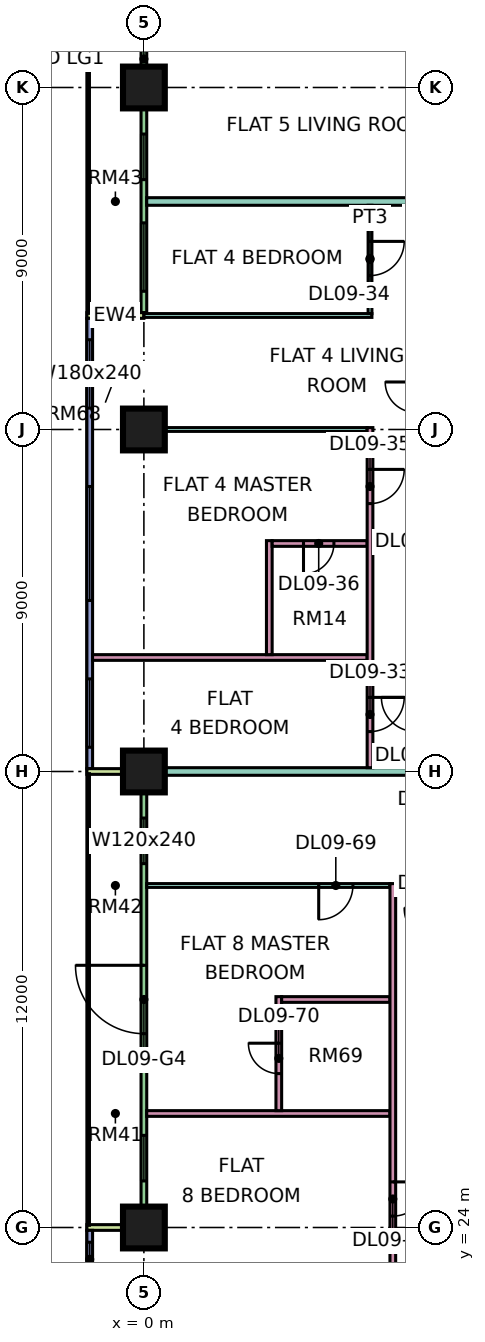
"""IFC4 building model, lengths in metres.
Left out: names, types, materials, properties, quantities, classifications, styles, units other than length and angle.
Written with IfcOpenShell. Run it as: python <this file> out.ifc"""

import sys

from ifc_helpers import new_model, si_unit, direction, frame, frame_2d, origin, origin_2d, place, context, subcontext, project, spatial, rectangle, extrude, element, fill, save


model = new_model("IFC4")
c1 = context("Model", 3, precision=1e-05, world=origin(), true_north=direction((0.0, 1.0)))
c2 = subcontext(c1, "Body", "Model", "MODEL_VIEW")
j1 = project(units=[si_unit("LENGTHUNIT", "METRE"), si_unit("PLANEANGLEUNIT", "RADIAN")], contexts=[c1])
p1 = place(None, origin())
s1 = spatial("IfcSite", under=j1, at=p1, CompositionType="ELEMENT")
p2 = place(p1, origin())
s2 = spatial("IfcBuilding", under=s1, at=p2, CompositionType="ELEMENT")
p3 = place(p2, frame((0.0, 0.0, 48.9)))
s3 = spatial("IfcBuildingStorey", under=s2, at=p3, CompositionType="ELEMENT", Elevation=48.9)
p4 = place(p3, frame((0.0, 24.0, 0.0), z_axis=(0.0, 0.0, 1.0), x_axis=(1.0, 0.0, 0.0)))
e1 = element("IfcColumn", 1, at=p4, inside=s3, PredefinedType="COLUMN", context=c2, shape_type="SweptSolid", body=[
    extrude(rectangle(XDim=1.1, YDim=1.1, at=origin_2d()), origin(), (0.0, 0.0, 1.0), 3.75),
])
p5 = place(p3, frame((0.0, 36.0, 0.0), z_axis=(0.0, 0.0, 1.0), x_axis=(1.0, 0.0, 0.0)))
e2 = element("IfcColumn", 2, at=p5, inside=s3, PredefinedType="COLUMN", context=c2, shape_type="SweptSolid", body=[
    extrude(rectangle(XDim=1.1, YDim=1.1, at=origin_2d()), origin(), (0.0, 0.0, 1.0), 3.75),
])
p6 = place(p3, frame((0.0, 45.0, 0.0), z_axis=(0.0, 0.0, 1.0), x_axis=(1.0, 0.0, 0.0)))
e3 = element("IfcColumn", 3, at=p6, inside=s3, PredefinedType="COLUMN", context=c2, shape_type="SweptSolid", body=[
    extrude(rectangle(XDim=1.1, YDim=1.1, at=origin_2d()), origin(), (0.0, 0.0, 1.0), 3.75),
])
p7 = place(p3, frame((0.0, 54.0, 0.0), z_axis=(0.0, 0.0, 1.0), x_axis=(1.0, 0.0, 0.0)))
e4 = element("IfcColumn", 4, at=p7, inside=s3, PredefinedType="COLUMN", context=c2, shape_type="SweptSolid", body=[
    extrude(rectangle(XDim=1.1, YDim=1.1, at=origin_2d()), origin(), (0.0, 0.0, 1.0), 3.75),
])
p8 = place(p3, frame((0.0, 61.425, 0.0), z_axis=(0.0, 0.0, 1.0), x_axis=(0.0, -1.0, 0.0)))
e5 = element("IfcWall", 5, at=p8, inside=s3, PredefinedType="SOLIDWALL", context=c2, shape_type="SweptSolid", body=[
    extrude(rectangle(XDim=13.35, YDim=0.15, at=frame_2d((6.675, 0.0))), origin(), (0.0, 0.0, 1.0), 3.35),
])
p9 = place(p8, frame((1.312, 0.0, 0.0)))
e6 = element("IfcOpeningElement", 6, at=p9, cuts=e5, PredefinedType="OPENING", context=c2, shape_type="SweptSolid", body=[
    extrude(rectangle(XDim=1.8, YDim=2.4, at=frame_2d((0.9, 1.2))), frame((0.0, 0.085, 0.0), z_axis=(0.0, -1.0, 0.0), x_axis=(1.0, 0.0, 0.0)), (0.0, 0.0, 1.0), 0.17),
])
p10 = place(p8, frame((5.0, 0.0, 0.45)))
e7 = element("IfcOpeningElement", 7, at=p10, cuts=e5, PredefinedType="OPENING", context=c2, shape_type="SweptSolid", body=[
    extrude(rectangle(XDim=1.2, YDim=2.4, at=frame_2d((0.6, 1.2))), frame((0.0, 0.085, 0.0), z_axis=(0.0, -1.0, 0.0), x_axis=(1.0, 0.0, 0.0)), (0.0, 0.0, 1.0), 0.17),
])
p11 = place(p8, frame((8.65, 0.0, 0.45)))
e8 = element("IfcOpeningElement", 8, at=p11, cuts=e5, PredefinedType="OPENING", context=c2, shape_type="SweptSolid", body=[
    extrude(rectangle(XDim=1.2, YDim=2.4, at=frame_2d((0.6, 1.2))), frame((0.0, 0.085, 0.0), z_axis=(0.0, -1.0, 0.0), x_axis=(1.0, 0.0, 0.0)), (0.0, 0.0, 1.0), 0.17),
])
p12 = place(p8, frame((10.988, 0.0, 0.45)))
e9 = element("IfcOpeningElement", 9, at=p12, cuts=e5, PredefinedType="OPENING", context=c2, shape_type="SweptSolid", body=[
    extrude(rectangle(XDim=1.8, YDim=2.4, at=frame_2d((0.9, 1.2))), frame((0.0, 0.085, 0.0), z_axis=(0.0, -1.0, 0.0), x_axis=(1.0, 0.0, 0.0)), (0.0, 0.0, 1.0), 0.17),
])
p13 = place(p3, frame((-1.5, 48.0, 0.0), z_axis=(0.0, 0.0, 1.0), x_axis=(1.0, 0.0, 0.0)))
e10 = element("IfcWall", 10, at=p13, inside=s3, PredefinedType="SOLIDWALL", context=c2, shape_type="SweptSolid", body=[
    extrude(rectangle(XDim=1.5, YDim=0.15, at=frame_2d((0.75, 0.0))), origin(), (0.0, 0.0, 1.0), 3.35),
])
p14 = place(p3, frame((-1.425, 47.925, 0.0), z_axis=(0.0, 0.0, 1.0), x_axis=(0.0, -1.0, 0.0)))
e11 = element("IfcWall", 11, at=p14, inside=s3, PredefinedType="SOLIDWALL", context=c2, shape_type="SweptSolid", body=[
    extrude(rectangle(XDim=11.85, YDim=0.15, at=frame_2d((5.925, 0.0))), origin(), (0.0, 0.0, 1.0), 3.35),
])
p15 = place(p14, frame((0.562, 0.0, 0.45)))
e12 = element("IfcOpeningElement", 12, at=p15, cuts=e11, PredefinedType="OPENING", context=c2, shape_type="SweptSolid", body=[
    extrude(rectangle(XDim=1.8, YDim=2.4, at=frame_2d((0.9, 1.2))), frame((0.0, 0.085, 0.0), z_axis=(0.0, -1.0, 0.0), x_axis=(1.0, 0.0, 0.0)), (0.0, 0.0, 1.0), 0.17),
])
p16 = place(p14, frame((4.425, 0.0, 0.45)))
e13 = element("IfcOpeningElement", 13, at=p16, cuts=e11, PredefinedType="OPENING", context=c2, shape_type="SweptSolid", body=[
    extrude(rectangle(XDim=3.0, YDim=2.4, at=frame_2d((1.5, 1.2))), frame((0.0, 0.085, 0.0), z_axis=(0.0, -1.0, 0.0), x_axis=(1.0, 0.0, 0.0)), (0.0, 0.0, 1.0), 0.17),
])
p17 = place(p14, frame((9.488, 0.0, 0.45)))
e14 = element("IfcOpeningElement", 14, at=p17, cuts=e11, PredefinedType="OPENING", context=c2, shape_type="SweptSolid", body=[
    extrude(rectangle(XDim=1.8, YDim=2.4, at=frame_2d((0.9, 1.2))), frame((0.0, 0.085, 0.0), z_axis=(0.0, -1.0, 0.0), x_axis=(1.0, 0.0, 0.0)), (0.0, 0.0, 1.0), 0.17),
])
p18 = place(p3, frame((0.0, 35.925, 0.0), z_axis=(0.0, 0.0, 1.0), x_axis=(0.0, -1.0, 0.0)))
e15 = element("IfcWall", 15, at=p18, inside=s3, PredefinedType="SOLIDWALL", context=c2, shape_type="SweptSolid", body=[
    extrude(rectangle(XDim=11.85, YDim=0.15, at=frame_2d((5.925, 0.0))), origin(), (0.0, 0.0, 1.0), 3.35),
])
p19 = place(p18, frame((1.15, 0.0, 0.45)))
e16 = element("IfcOpeningElement", 16, at=p19, cuts=e15, PredefinedType="OPENING", context=c2, shape_type="SweptSolid", body=[
    extrude(rectangle(XDim=1.2, YDim=2.4, at=frame_2d((0.6, 1.2))), frame((0.0, 0.085, 0.0), z_axis=(0.0, -1.0, 0.0), x_axis=(1.0, 0.0, 0.0)), (0.0, 0.0, 1.0), 0.17),
])
p20 = place(p18, frame((5.025, 0.0, 0.0)))
e17 = element("IfcOpeningElement", 17, at=p20, cuts=e15, PredefinedType="OPENING", context=c2, shape_type="SweptSolid", body=[
    extrude(rectangle(XDim=1.8, YDim=2.4, at=frame_2d((0.9, 1.2))), frame((0.0, 0.085, 0.0), z_axis=(0.0, -1.0, 0.0), x_axis=(1.0, 0.0, 0.0)), (0.0, 0.0, 1.0), 0.17),
])
p21 = place(p18, frame((9.5, 0.0, 0.45)))
e18 = element("IfcOpeningElement", 18, at=p21, cuts=e15, PredefinedType="OPENING", context=c2, shape_type="SweptSolid", body=[
    extrude(rectangle(XDim=1.2, YDim=2.4, at=frame_2d((0.6, 1.2))), frame((0.0, 0.085, 0.0), z_axis=(0.0, -1.0, 0.0), x_axis=(1.0, 0.0, 0.0)), (0.0, 0.0, 1.0), 0.17),
])
for number, where, z_axis, x_axis in (
    (19, (-1.5, 36.0, 0.0), (0.0, 0.0, 1.0), (1.0, 0.0, 0.0)),
    (20, (-1.5, 24.0, 0.0), (0.0, 0.0, 1.0), (1.0, 0.0, 0.0)),
):
    element("IfcWall", number, at=place(p3, frame(where, z_axis=z_axis, x_axis=x_axis)), inside=s3, PredefinedType="SOLIDWALL", context=c2, shape_type="SweptSolid", body=[
        extrude(rectangle(XDim=1.5, YDim=0.15, at=frame_2d((0.75, 0.0))), origin(), (0.0, 0.0, 1.0), 3.35),
    ])
p22 = place(p3, frame((-1.425, 23.925, 0.0), z_axis=(0.0, 0.0, 1.0), x_axis=(0.0, -1.0, 0.0)))
e21 = element("IfcWall", 21, at=p22, inside=s3, PredefinedType="SOLIDWALL", context=c2, shape_type="SweptSolid", body=[
    extrude(rectangle(XDim=11.425, YDim=0.15, at=frame_2d((5.712, 0.0))), origin(), (0.0, 0.0, 1.0), 3.35),
])
p23 = place(p22, frame((0.312, 0.0, 0.45)))
e22 = element("IfcOpeningElement", 22, at=p23, cuts=e21, PredefinedType="OPENING", context=c2, shape_type="SweptSolid", body=[
    extrude(rectangle(XDim=0.9, YDim=2.4, at=frame_2d((0.45, 1.2))), frame((0.0, 0.085, 0.0), z_axis=(0.0, -1.0, 0.0), x_axis=(1.0, 0.0, 0.0)), (0.0, 0.0, 1.0), 0.17),
])
p24 = place(p22, frame((6.175, 0.0, 0.45)))
e23 = element("IfcOpeningElement", 23, at=p24, cuts=e21, PredefinedType="OPENING", context=c2, shape_type="SweptSolid", body=[
    extrude(rectangle(XDim=3.0, YDim=2.4, at=frame_2d((1.5, 1.2))), frame((0.0, 0.085, 0.0), z_axis=(0.0, -1.0, 0.0), x_axis=(1.0, 0.0, 0.0)), (0.0, 0.0, 1.0), 0.17),
])
p25 = place(p3, frame((-1.351, 39.0, 0.0), z_axis=(0.0, 0.0, 1.0), x_axis=(1.0, 0.0, 0.0)))
e24 = element("IfcWall", 24, at=p25, inside=s3, PredefinedType="PARTITIONING", context=c2, shape_type="SweptSolid", body=[
    extrude(rectangle(XDim=7.226, YDim=0.15, at=frame_2d((3.613, 0.0))), origin(), (0.0, 0.0, 1.0), 3.35),
])
e25 = element("IfcWall", 25, at=p5, inside=s3, PredefinedType="PARTITIONING", context=c2, shape_type="SweptSolid", body=[
    extrude(rectangle(XDim=12.45, YDim=0.2, at=frame_2d((6.225, 0.0))), origin(), (0.0, 0.0, 1.0), 3.35),
])
e26 = element("IfcWall", 26, at=p6, inside=s3, PredefinedType="PARTITIONING", context=c2, shape_type="SweptSolid", body=[
    extrude(rectangle(XDim=5.875, YDim=0.1, at=frame_2d((2.938, 0.0))), origin(), (0.0, 0.0, 1.0), 3.35),
])
p26 = place(p3, frame((0.0, 48.0, 0.0), z_axis=(0.0, 0.0, 1.0), x_axis=(1.0, 0.0, 0.0)))
e27 = element("IfcWall", 27, at=p26, inside=s3, PredefinedType="PARTITIONING", context=c2, shape_type="SweptSolid", body=[
    extrude(rectangle(XDim=6.0, YDim=0.1, at=frame_2d((3.0, 0.0))), origin(), (0.0, 0.0, 1.0), 3.35),
])
p27 = place(p3, frame((0.074, 27.0, 0.0), z_axis=(0.0, 0.0, 1.0), x_axis=(1.0, 0.0, 0.0)))
e28 = element("IfcWall", 28, at=p27, inside=s3, PredefinedType="PARTITIONING", context=c2, shape_type="SweptSolid", body=[
    extrude(rectangle(XDim=6.401, YDim=0.15, at=frame_2d((3.201, 0.0))), origin(), (0.0, 0.0, 1.0), 3.35),
])
p28 = place(p3, frame((0.074, 33.0, 0.0), z_axis=(0.0, 0.0, 1.0), x_axis=(1.0, 0.0, 0.0)))
e29 = element("IfcWall", 29, at=p28, inside=s3, PredefinedType="PARTITIONING", context=c2, shape_type="SweptSolid", body=[
    extrude(rectangle(XDim=6.401, YDim=0.1, at=frame_2d((3.201, 0.0))), origin(), (0.0, 0.0, 1.0), 3.35),
])
p29 = place(p28, frame((4.526, 0.0, 0.0)))
e30 = element("IfcOpeningElement", 30, at=p29, cuts=e29, PredefinedType="OPENING", context=c2, shape_type="SweptSolid", body=[
    extrude(rectangle(XDim=0.9, YDim=2.1, at=frame_2d((0.45, 1.05))), frame((0.0, 0.06, 0.0), z_axis=(0.0, -1.0, 0.0), x_axis=(1.0, 0.0, 0.0)), (0.0, 0.0, 1.0), 0.12),
])
p30 = place(p3, frame((0.074, 51.0, 0.0), z_axis=(0.0, 0.0, 1.0), x_axis=(1.0, 0.0, 0.0)))
e31 = element("IfcWall", 31, at=p30, inside=s3, PredefinedType="PARTITIONING", context=c2, shape_type="SweptSolid", body=[
    extrude(rectangle(XDim=12.376, YDim=0.2, at=frame_2d((6.188, 0.0))), origin(), (0.0, 0.0, 1.0), 3.35),
])
p31 = place(p3, frame((3.3, 39.075, 0.0), z_axis=(0.0, 0.0, 1.0), x_axis=(0.0, 1.0, 0.0)))
e32 = element("IfcWall", 32, at=p31, inside=s3, PredefinedType="PARTITIONING", context=c2, shape_type="SweptSolid", body=[
    extrude(rectangle(XDim=3.0, YDim=0.15, at=frame_2d((1.5, 0.0))), origin(), (0.0, 0.0, 1.0), 3.35),
])
p32 = place(p3, frame((3.375, 42.0, 0.0), z_axis=(0.0, 0.0, 1.0), x_axis=(1.0, 0.0, 0.0)))
e33 = element("IfcWall", 33, at=p32, inside=s3, PredefinedType="PARTITIONING", context=c2, shape_type="SweptSolid", body=[
    extrude(rectangle(XDim=2.5, YDim=0.15, at=frame_2d((1.25, 0.0))), origin(), (0.0, 0.0, 1.0), 3.35),
])
p33 = place(p32, frame((0.825, 0.0, 0.0)))
e34 = element("IfcOpeningElement", 34, at=p33, cuts=e33, PredefinedType="OPENING", context=c2, shape_type="SweptSolid", body=[
    extrude(rectangle(XDim=0.8, YDim=2.1, at=frame_2d((0.4, 1.05))), frame((0.0, 0.085, 0.0), z_axis=(0.0, -1.0, 0.0), x_axis=(1.0, 0.0, 0.0)), (0.0, 0.0, 1.0), 0.17),
])
p34 = place(p3, frame((3.55, 27.075, 0.0), z_axis=(0.0, 0.0, 1.0), x_axis=(0.0, 1.0, 0.0)))
e35 = element("IfcWall", 35, at=p34, inside=s3, PredefinedType="PARTITIONING", context=c2, shape_type="SweptSolid", body=[
    extrude(rectangle(XDim=3.0, YDim=0.15, at=frame_2d((1.5, 0.0))), origin(), (0.0, 0.0, 1.0), 3.35),
])
p35 = place(p34, frame((0.975, 0.0, 0.0)))
e36 = element("IfcOpeningElement", 36, at=p35, cuts=e35, PredefinedType="OPENING", context=c2, shape_type="SweptSolid", body=[
    extrude(rectangle(XDim=0.8, YDim=2.1, at=frame_2d((0.4, 1.05))), frame((0.0, 0.085, 0.0), z_axis=(0.0, -1.0, 0.0), x_axis=(1.0, 0.0, 0.0)), (0.0, 0.0, 1.0), 0.17),
])
p36 = place(p3, frame((3.625, 30.0, 0.0), z_axis=(0.0, 0.0, 1.0), x_axis=(1.0, 0.0, 0.0)))
e37 = element("IfcWall", 37, at=p36, inside=s3, PredefinedType="PARTITIONING", context=c2, shape_type="SweptSolid", body=[
    extrude(rectangle(XDim=2.85, YDim=0.15, at=frame_2d((1.425, 0.0))), origin(), (0.0, 0.0, 1.0), 3.35),
])
p37 = place(p3, frame((5.95, 36.1, 0.0), z_axis=(0.0, 0.0, 1.0), x_axis=(0.0, 1.0, 0.0)))
e38 = element("IfcWall", 38, at=p37, inside=s3, PredefinedType="PARTITIONING", context=c2, shape_type="SweptSolid", body=[
    extrude(rectangle(XDim=8.95, YDim=0.15, at=frame_2d((4.475, 0.0))), origin(), (0.0, 0.0, 1.0), 3.35),
])
p38 = place(p37, frame((0.95, 0.0, 0.0)))
e39 = element("IfcOpeningElement", 39, at=p38, cuts=e38, PredefinedType="OPENING", context=c2, shape_type="SweptSolid", body=[
    extrude(rectangle(XDim=0.9, YDim=2.1, at=frame_2d((0.45, 1.05))), frame((0.0, 0.085, 0.0), z_axis=(0.0, -1.0, 0.0), x_axis=(1.0, 0.0, 0.0)), (0.0, 0.0, 1.0), 0.17),
])
p39 = place(p37, frame((6.95, 0.0, 0.0)))
e40 = element("IfcOpeningElement", 40, at=p39, cuts=e38, PredefinedType="OPENING", context=c2, shape_type="SweptSolid", body=[
    extrude(rectangle(XDim=0.9, YDim=2.1, at=frame_2d((0.45, 1.05))), frame((0.0, 0.085, 0.0), z_axis=(0.0, -1.0, 0.0), x_axis=(1.0, 0.0, 0.0)), (0.0, 0.0, 1.0), 0.17),
])
p40 = place(p3, frame((5.95, 48.05, 0.0), z_axis=(0.0, 0.0, 1.0), x_axis=(0.0, 1.0, 0.0)))
e41 = element("IfcWall", 41, at=p40, inside=s3, PredefinedType="PARTITIONING", context=c2, shape_type="SweptSolid", body=[
    extrude(rectangle(XDim=2.85, YDim=0.1, at=frame_2d((1.425, 0.0))), origin(), (0.0, 0.0, 1.0), 3.35),
])
p41 = place(p40, frame((1.0, 0.0, 0.0)))
e42 = element("IfcOpeningElement", 42, at=p41, cuts=e41, PredefinedType="OPENING", context=c2, shape_type="SweptSolid", body=[
    extrude(rectangle(XDim=0.9, YDim=2.1, at=frame_2d((0.45, 1.05))), frame((0.0, 0.06, 0.0), z_axis=(0.0, -1.0, 0.0), x_axis=(1.0, 0.0, 0.0)), (0.0, 0.0, 1.0), 0.12),
])
p42 = place(p3, frame((6.55, 22.5, 0.0), z_axis=(0.0, 0.0, 1.0), x_axis=(0.0, 1.0, 0.0)))
e43 = element("IfcWall", 43, at=p42, inside=s3, PredefinedType="PARTITIONING", context=c2, shape_type="SweptSolid", body=[
    extrude(rectangle(XDim=10.55, YDim=0.15, at=frame_2d((5.275, 0.0))), origin(), (0.0, 0.0, 1.0), 3.35),
])
p43 = place(p42, frame((1.8, 0.0, 0.0)))
e44 = element("IfcOpeningElement", 44, at=p43, cuts=e43, PredefinedType="OPENING", context=c2, shape_type="SweptSolid", body=[
    extrude(rectangle(XDim=0.9, YDim=2.1, at=frame_2d((0.45, 1.05))), frame((0.0, 0.085, 0.0), z_axis=(0.0, -1.0, 0.0), x_axis=(1.0, 0.0, 0.0)), (0.0, 0.0, 1.0), 0.17),
])
p44 = place(p11, origin())
e45 = element("IfcWindow", 45, at=p44, inside=s3, PartitioningType="SINGLE_PANEL", PredefinedType="WINDOW", context=c2, shape_type="SweptSolid", body=[
    extrude(rectangle(XDim=1.2, YDim=2.4, at=frame_2d((0.6, 1.2))), frame((0.0, 0.03, 0.0), z_axis=(0.0, -1.0, 0.0), x_axis=(1.0, 0.0, 0.0)), (0.0, 0.0, 1.0), 0.06),
])
fill(e8, e45)
p45 = place(p12, origin())
e46 = element("IfcWindow", 46, at=p45, inside=s3, PartitioningType="SINGLE_PANEL", PredefinedType="WINDOW", context=c2, shape_type="SweptSolid", body=[
    extrude(rectangle(XDim=1.8, YDim=2.4, at=frame_2d((0.9, 1.2))), frame((0.0, 0.03, 0.0), z_axis=(0.0, -1.0, 0.0), x_axis=(1.0, 0.0, 0.0)), (0.0, 0.0, 1.0), 0.06),
])
fill(e9, e46)
p46 = place(p15, origin())
e47 = element("IfcWindow", 47, at=p46, inside=s3, PartitioningType="SINGLE_PANEL", PredefinedType="WINDOW", context=c2, shape_type="SweptSolid", body=[
    extrude(rectangle(XDim=1.8, YDim=2.4, at=frame_2d((0.9, 1.2))), frame((0.0, 0.03, 0.0), z_axis=(0.0, -1.0, 0.0), x_axis=(1.0, 0.0, 0.0)), (0.0, 0.0, 1.0), 0.06),
])
fill(e12, e47)
p47 = place(p16, origin())
e48 = element("IfcWindow", 48, at=p47, inside=s3, PartitioningType="SINGLE_PANEL", PredefinedType="WINDOW", context=c2, shape_type="SweptSolid", body=[
    extrude(rectangle(XDim=3.0, YDim=2.4, at=frame_2d((1.5, 1.2))), frame((0.0, 0.03, 0.0), z_axis=(0.0, -1.0, 0.0), x_axis=(1.0, 0.0, 0.0)), (0.0, 0.0, 1.0), 0.06),
])
fill(e13, e48)
p48 = place(p17, origin())
e49 = element("IfcWindow", 49, at=p48, inside=s3, PartitioningType="SINGLE_PANEL", PredefinedType="WINDOW", context=c2, shape_type="SweptSolid", body=[
    extrude(rectangle(XDim=1.8, YDim=2.4, at=frame_2d((0.9, 1.2))), frame((0.0, 0.03, 0.0), z_axis=(0.0, -1.0, 0.0), x_axis=(1.0, 0.0, 0.0)), (0.0, 0.0, 1.0), 0.06),
])
fill(e14, e49)
p49 = place(p19, origin())
e50 = element("IfcWindow", 50, at=p49, inside=s3, PartitioningType="SINGLE_PANEL", PredefinedType="WINDOW", context=c2, shape_type="SweptSolid", body=[
    extrude(rectangle(XDim=1.2, YDim=2.4, at=frame_2d((0.6, 1.2))), frame((0.0, 0.03, 0.0), z_axis=(0.0, -1.0, 0.0), x_axis=(1.0, 0.0, 0.0)), (0.0, 0.0, 1.0), 0.06),
])
fill(e16, e50)
p50 = place(p20, frame((1.8, 0.0, 0.0), z_axis=(0.0, 0.0, 1.0), x_axis=(-1.0, 0.0, 0.0)))
e51 = element("IfcDoor", 51, at=p50, inside=s3, OperationType="DOUBLE_DOOR_SINGLE_SWING", PredefinedType="DOOR", context=c2, shape_type="SweptSolid", body=[
    extrude(rectangle(XDim=1.8, YDim=2.4, at=frame_2d((0.9, 1.2))), frame((0.0, 0.025, 0.0), z_axis=(0.0, -1.0, 0.0), x_axis=(1.0, 0.0, 0.0)), (0.0, 0.0, 1.0), 0.05),
])
fill(e17, e51)
p51 = place(p21, origin())
e52 = element("IfcWindow", 52, at=p51, inside=s3, PartitioningType="SINGLE_PANEL", PredefinedType="WINDOW", context=c2, shape_type="SweptSolid", body=[
    extrude(rectangle(XDim=1.2, YDim=2.4, at=frame_2d((0.6, 1.2))), frame((0.0, 0.03, 0.0), z_axis=(0.0, -1.0, 0.0), x_axis=(1.0, 0.0, 0.0)), (0.0, 0.0, 1.0), 0.06),
])
fill(e18, e52)
p52 = place(p23, origin())
e53 = element("IfcWindow", 53, at=p52, inside=s3, PartitioningType="SINGLE_PANEL", PredefinedType="WINDOW", context=c2, shape_type="SweptSolid", body=[
    extrude(rectangle(XDim=0.9, YDim=2.4, at=frame_2d((0.45, 1.2))), frame((0.0, 0.03, 0.0), z_axis=(0.0, -1.0, 0.0), x_axis=(1.0, 0.0, 0.0)), (0.0, 0.0, 1.0), 0.06),
])
fill(e22, e53)
p53 = place(p38, origin())
e54 = element("IfcDoor", 54, at=p53, inside=s3, OperationType="SINGLE_SWING_RIGHT", PredefinedType="DOOR", context=c2, shape_type="SweptSolid", body=[
    extrude(rectangle(XDim=0.9, YDim=2.1, at=frame_2d((0.45, 1.05))), frame((0.0, 0.025, 0.0), z_axis=(0.0, -1.0, 0.0), x_axis=(1.0, 0.0, 0.0)), (0.0, 0.0, 1.0), 0.05),
])
fill(e39, e54)
p54 = place(p41, origin())
e55 = element("IfcDoor", 55, at=p54, inside=s3, OperationType="SINGLE_SWING_RIGHT", PredefinedType="DOOR", context=c2, shape_type="SweptSolid", body=[
    extrude(rectangle(XDim=0.9, YDim=2.1, at=frame_2d((0.45, 1.05))), frame((0.0, 0.025, 0.0), z_axis=(0.0, -1.0, 0.0), x_axis=(1.0, 0.0, 0.0)), (0.0, 0.0, 1.0), 0.05),
])
fill(e42, e55)
p55 = place(p39, origin())
e56 = element("IfcDoor", 56, at=p55, inside=s3, OperationType="SINGLE_SWING_RIGHT", PredefinedType="DOOR", context=c2, shape_type="SweptSolid", body=[
    extrude(rectangle(XDim=0.9, YDim=2.1, at=frame_2d((0.45, 1.05))), frame((0.0, 0.025, 0.0), z_axis=(0.0, -1.0, 0.0), x_axis=(1.0, 0.0, 0.0)), (0.0, 0.0, 1.0), 0.05),
])
fill(e40, e56)
p56 = place(p33, frame((0.8, 0.0, 0.0), z_axis=(0.0, 0.0, 1.0), x_axis=(-1.0, 0.0, 0.0)))
e57 = element("IfcDoor", 57, at=p56, inside=s3, OperationType="SINGLE_SWING_LEFT", PredefinedType="DOOR", context=c2, shape_type="SweptSolid", body=[
    extrude(rectangle(XDim=0.8, YDim=2.1, at=frame_2d((0.4, 1.05))), frame((0.0, 0.025, 0.0), z_axis=(0.0, -1.0, 0.0), x_axis=(1.0, 0.0, 0.0)), (0.0, 0.0, 1.0), 0.05),
])
fill(e34, e57)
p57 = place(p43, origin())
e58 = element("IfcDoor", 58, at=p57, inside=s3, OperationType="SINGLE_SWING_RIGHT", PredefinedType="DOOR", context=c2, shape_type="SweptSolid", body=[
    extrude(rectangle(XDim=0.9, YDim=2.1, at=frame_2d((0.45, 1.05))), frame((0.0, 0.025, 0.0), z_axis=(0.0, -1.0, 0.0), x_axis=(1.0, 0.0, 0.0)), (0.0, 0.0, 1.0), 0.05),
])
fill(e44, e58)
p58 = place(p29, frame((0.9, 0.0, 0.0), z_axis=(0.0, 0.0, 1.0), x_axis=(-1.0, 0.0, 0.0)))
e59 = element("IfcDoor", 59, at=p58, inside=s3, OperationType="SINGLE_SWING_LEFT", PredefinedType="DOOR", context=c2, shape_type="SweptSolid", body=[
    extrude(rectangle(XDim=0.9, YDim=2.1, at=frame_2d((0.45, 1.05))), frame((0.0, 0.025, 0.0), z_axis=(0.0, -1.0, 0.0), x_axis=(1.0, 0.0, 0.0)), (0.0, 0.0, 1.0), 0.05),
])
fill(e30, e59)
p59 = place(p35, frame((0.8, 0.0, 0.0), z_axis=(0.0, 0.0, 1.0), x_axis=(-1.0, 0.0, 0.0)))
e60 = element("IfcDoor", 60, at=p59, inside=s3, OperationType="SINGLE_SWING_RIGHT", PredefinedType="DOOR", context=c2, shape_type="SweptSolid", body=[
    extrude(rectangle(XDim=0.8, YDim=2.1, at=frame_2d((0.4, 1.05))), frame((0.0, 0.025, 0.0), z_axis=(0.0, -1.0, 0.0), x_axis=(1.0, 0.0, 0.0)), (0.0, 0.0, 1.0), 0.05),
])
fill(e36, e60)
save(model, sys.argv[1])
